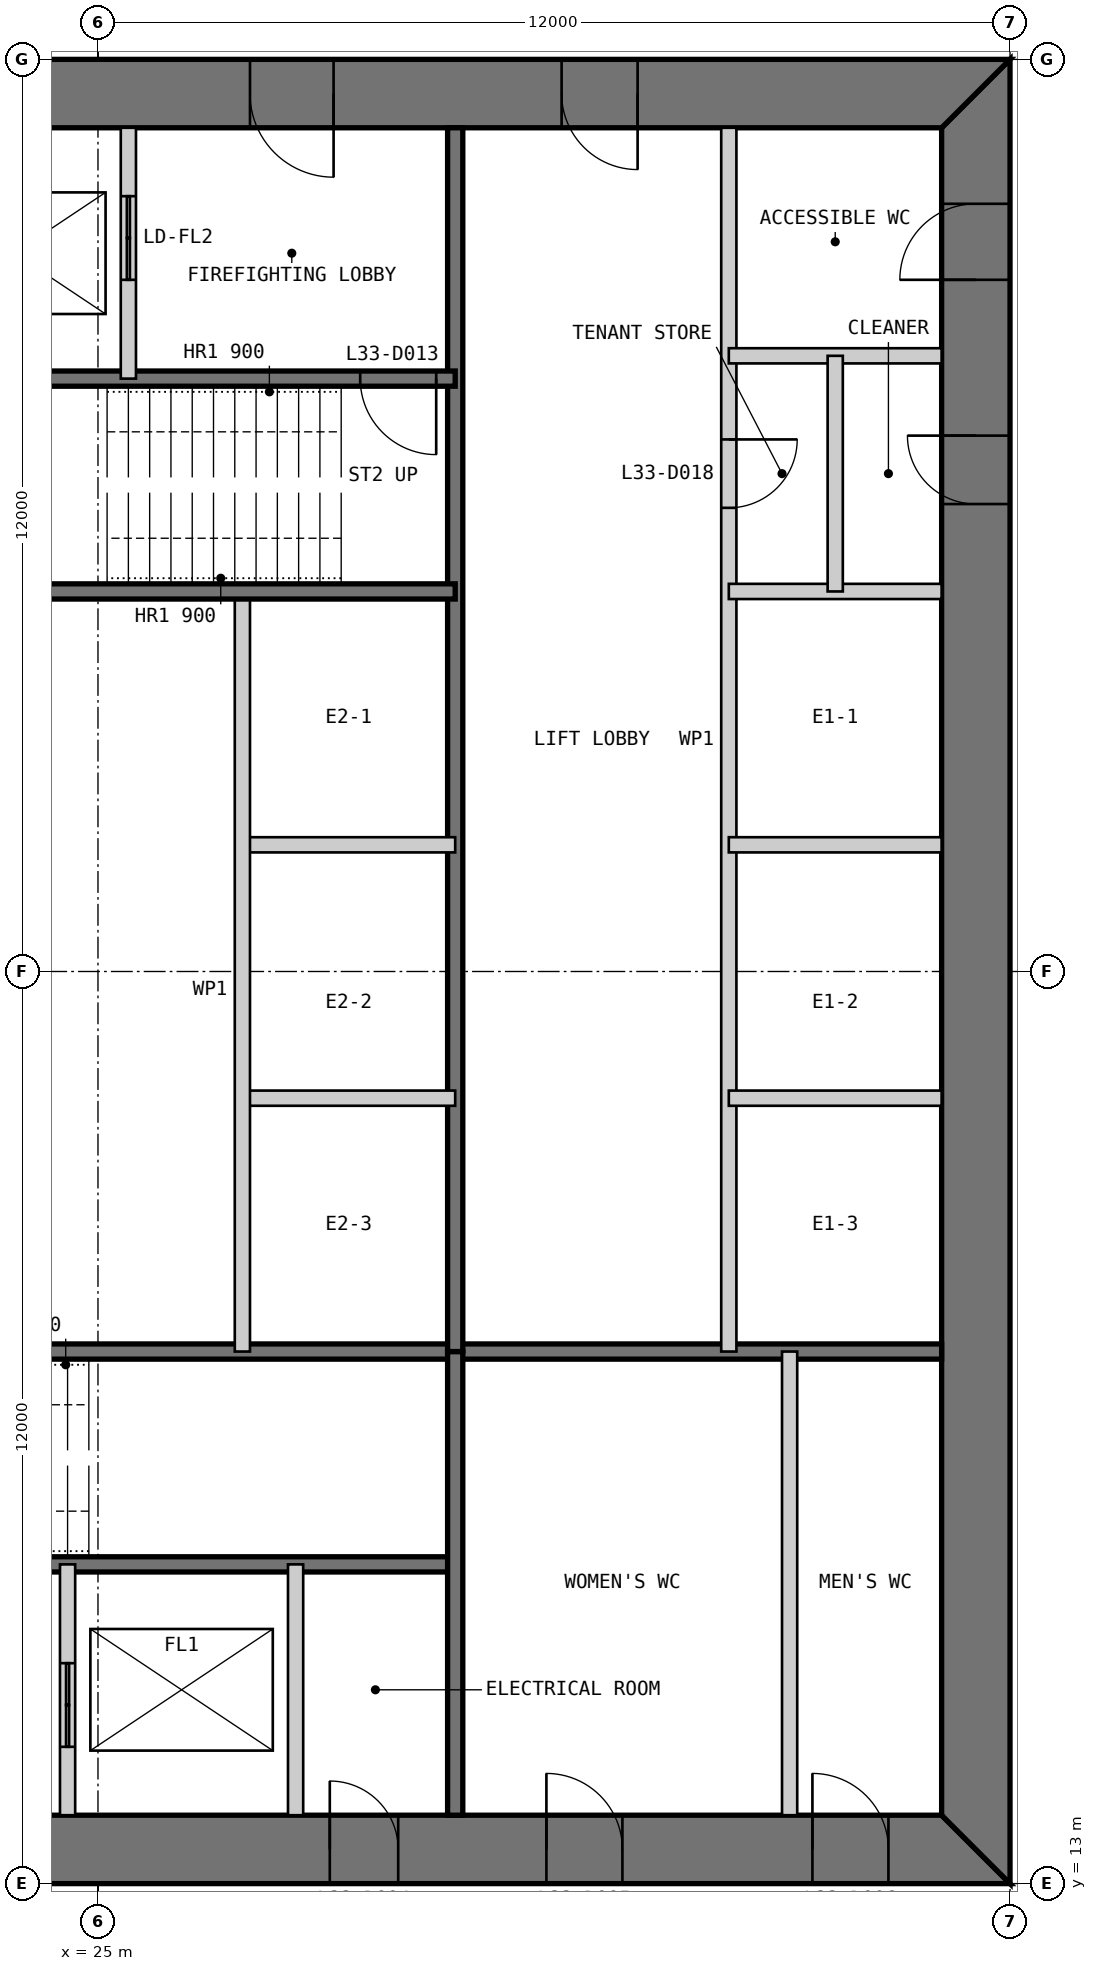
"""IFC4 building model, lengths in metres.
Left out: names, types, materials, properties, quantities, classifications, styles, units other than length and angle.
Written with IfcOpenShell. Run it as: python <this file> out.ifc"""

import sys

from ifc_helpers import new_model, si_unit, direction, frame, frame_2d, origin, place, context, subcontext, project, spatial, polyline, rectangle, outline, extrude, element, fill, save


model = new_model("IFC4")
c1 = context("Model", 3, precision=1e-05, world=origin(), true_north=direction((0.0, 1.0)))
c2 = subcontext(c1, "Body", "Model", "MODEL_VIEW")
j1 = project(units=[si_unit("LENGTHUNIT", "METRE"), si_unit("PLANEANGLEUNIT", "RADIAN")], contexts=[c1])
p1 = place(None, origin())
s1 = spatial("IfcSite", under=j1, at=p1, CompositionType="ELEMENT")
p2 = place(p1, origin())
s2 = spatial("IfcBuilding", under=s1, at=p2, CompositionType="ELEMENT")
p3 = place(p2, frame((0.0, 0.0, 142.4)))
s3 = spatial("IfcBuildingStorey", under=s2, at=p3, CompositionType="ELEMENT", Elevation=142.4)
p4 = place(p3, frame((13.0, 13.45, 0.0), z_axis=(0.0, 0.0, 1.0), x_axis=(1.0, 0.0, 0.0)))
e1 = element("IfcWall", 1, at=p4, inside=s3, PredefinedType="SHEAR", context=c2, shape_type="SweptSolid", body=[
    extrude(outline(polyline([(0.0, -0.45), (24.0, -0.45), (23.1, 0.45), (0.9, 0.45), (0.0, -0.45)])), origin(), (0.0, 0.0, 1.0), 4.0),
])
p5 = place(p4, frame((4.9, 0.0, 0.0)))
e2 = element("IfcOpeningElement", 2, at=p5, cuts=e1, PredefinedType="OPENING", context=c2, shape_type="SweptSolid", body=[
    extrude(rectangle(XDim=1.0, YDim=2.2, at=frame_2d((0.5, 1.1))), frame((0.0, 0.46, 0.0), z_axis=(0.0, -1.0, 0.0), x_axis=(1.0, 0.0, 0.0)), (0.0, 0.0, 1.0), 0.92),
])
p6 = place(p4, frame((8.9, 0.0, 0.0)))
e3 = element("IfcOpeningElement", 3, at=p6, cuts=e1, PredefinedType="OPENING", context=c2, shape_type="SweptSolid", body=[
    extrude(rectangle(XDim=1.1, YDim=2.2, at=frame_2d((0.55, 1.1))), frame((0.0, 0.46, 0.0), z_axis=(0.0, -1.0, 0.0), x_axis=(1.0, 0.0, 0.0)), (0.0, 0.0, 1.0), 0.92),
])
p7 = place(p4, frame((15.05, 0.0, 0.0)))
e4 = element("IfcOpeningElement", 4, at=p7, cuts=e1, PredefinedType="OPENING", context=c2, shape_type="SweptSolid", body=[
    extrude(rectangle(XDim=0.9, YDim=2.2, at=frame_2d((0.45, 1.1))), frame((0.0, 0.46, 0.0), z_axis=(0.0, -1.0, 0.0), x_axis=(1.0, 0.0, 0.0)), (0.0, 0.0, 1.0), 0.92),
])
p8 = place(p4, frame((17.9, 0.0, 0.0)))
e5 = element("IfcOpeningElement", 5, at=p8, cuts=e1, PredefinedType="OPENING", context=c2, shape_type="SweptSolid", body=[
    extrude(rectangle(XDim=1.0, YDim=2.2, at=frame_2d((0.5, 1.1))), frame((0.0, 0.46, 0.0), z_axis=(0.0, -1.0, 0.0), x_axis=(1.0, 0.0, 0.0)), (0.0, 0.0, 1.0), 0.92),
])
p9 = place(p4, frame((21.4, 0.0, 0.0)))
e6 = element("IfcOpeningElement", 6, at=p9, cuts=e1, PredefinedType="OPENING", context=c2, shape_type="SweptSolid", body=[
    extrude(rectangle(XDim=1.0, YDim=2.2, at=frame_2d((0.5, 1.1))), frame((0.0, 0.46, 0.0), z_axis=(0.0, -1.0, 0.0), x_axis=(1.0, 0.0, 0.0)), (0.0, 0.0, 1.0), 0.92),
])
p10 = place(p3, frame((36.55, 13.9, 0.0), z_axis=(0.0, 0.0, 1.0), x_axis=(0.0, 1.0, 0.0)))
e7 = element("IfcWall", 7, at=p10, inside=s3, PredefinedType="SHEAR", context=c2, shape_type="SweptSolid", body=[
    extrude(outline(polyline([(-0.9, -0.45), (23.1, -0.45), (22.2, 0.45), (0.0, 0.45), (-0.9, -0.45)])), origin(), (0.0, 0.0, 1.0), 4.0),
])
p11 = place(p10, frame((20.2, 0.0, 0.0)))
e8 = element("IfcOpeningElement", 8, at=p11, cuts=e7, PredefinedType="OPENING", context=c2, shape_type="SweptSolid", body=[
    extrude(rectangle(XDim=1.0, YDim=2.2, at=frame_2d((0.5, 1.1))), frame((0.0, 0.46, 0.0), z_axis=(0.0, -1.0, 0.0), x_axis=(1.0, 0.0, 0.0)), (0.0, 0.0, 1.0), 0.92),
])
p12 = place(p10, frame((17.25, 0.0, 0.0)))
e9 = element("IfcOpeningElement", 9, at=p12, cuts=e7, PredefinedType="OPENING", context=c2, shape_type="SweptSolid", body=[
    extrude(rectangle(XDim=0.9, YDim=2.2, at=frame_2d((0.45, 1.1))), frame((0.0, 0.46, 0.0), z_axis=(0.0, -1.0, 0.0), x_axis=(1.0, 0.0, 0.0)), (0.0, 0.0, 1.0), 0.92),
])
p13 = place(p3, frame((37.0, 36.55, 0.0), z_axis=(0.0, 0.0, 1.0), x_axis=(-1.0, 0.0, 0.0)))
e10 = element("IfcWall", 10, at=p13, inside=s3, PredefinedType="SHEAR", context=c2, shape_type="SweptSolid", body=[
    extrude(outline(polyline([(0.0, -0.45), (24.0, -0.45), (23.1, 0.45), (0.9, 0.45), (0.0, -0.45)])), origin(), (0.0, 0.0, 1.0), 4.0),
])
p14 = place(p13, frame((4.9, 0.0, 0.0)))
e11 = element("IfcOpeningElement", 11, at=p14, cuts=e10, PredefinedType="OPENING", context=c2, shape_type="SweptSolid", body=[
    extrude(rectangle(XDim=1.0, YDim=2.2, at=frame_2d((0.5, 1.1))), frame((0.0, 0.46, 0.0), z_axis=(0.0, -1.0, 0.0), x_axis=(1.0, 0.0, 0.0)), (0.0, 0.0, 1.0), 0.92),
])
p15 = place(p13, frame((8.9, 0.0, 0.0)))
e12 = element("IfcOpeningElement", 12, at=p15, cuts=e10, PredefinedType="OPENING", context=c2, shape_type="SweptSolid", body=[
    extrude(rectangle(XDim=1.1, YDim=2.2, at=frame_2d((0.55, 1.1))), frame((0.0, 0.46, 0.0), z_axis=(0.0, -1.0, 0.0), x_axis=(1.0, 0.0, 0.0)), (0.0, 0.0, 1.0), 0.92),
])
p16 = place(p13, frame((15.05, 0.0, 0.0)))
e13 = element("IfcOpeningElement", 13, at=p16, cuts=e10, PredefinedType="OPENING", context=c2, shape_type="SweptSolid", body=[
    extrude(rectangle(XDim=0.9, YDim=2.2, at=frame_2d((0.45, 1.1))), frame((0.0, 0.46, 0.0), z_axis=(0.0, -1.0, 0.0), x_axis=(1.0, 0.0, 0.0)), (0.0, 0.0, 1.0), 0.92),
])
p17 = place(p13, frame((17.9, 0.0, 0.0)))
e14 = element("IfcOpeningElement", 14, at=p17, cuts=e10, PredefinedType="OPENING", context=c2, shape_type="SweptSolid", body=[
    extrude(rectangle(XDim=1.0, YDim=2.2, at=frame_2d((0.5, 1.1))), frame((0.0, 0.46, 0.0), z_axis=(0.0, -1.0, 0.0), x_axis=(1.0, 0.0, 0.0)), (0.0, 0.0, 1.0), 0.92),
])
p18 = place(p13, frame((21.4, 0.0, 0.0)))
e15 = element("IfcOpeningElement", 15, at=p18, cuts=e10, PredefinedType="OPENING", context=c2, shape_type="SweptSolid", body=[
    extrude(rectangle(XDim=1.0, YDim=2.2, at=frame_2d((0.5, 1.1))), frame((0.0, 0.46, 0.0), z_axis=(0.0, -1.0, 0.0), x_axis=(1.0, 0.0, 0.0)), (0.0, 0.0, 1.0), 0.92),
])
p19 = place(p3, frame((20.3, 17.2, 0.0), z_axis=(0.0, 0.0, 1.0), x_axis=(1.0, 0.0, 0.0)))
e16 = element("IfcWall", 16, at=p19, inside=s3, PredefinedType="SOLIDWALL", context=c2, shape_type="SweptSolid", body=[
    extrude(rectangle(XDim=9.4, YDim=0.2, at=frame_2d((4.7, 0.0))), origin(), (0.0, 0.0, 1.0), 3.8),
])
p20 = place(p19, frame((0.25, 0.0, 0.0)))
e17 = element("IfcOpeningElement", 17, at=p20, cuts=e16, PredefinedType="OPENING", context=c2, shape_type="SweptSolid", body=[
    extrude(rectangle(XDim=1.0, YDim=2.2, at=frame_2d((0.5, 1.1))), frame((0.0, 0.11, 0.0), z_axis=(0.0, -1.0, 0.0), x_axis=(1.0, 0.0, 0.0)), (0.0, 0.0, 1.0), 0.22),
])
p21 = place(p3, frame((20.3, 20.0, 0.0), z_axis=(0.0, 0.0, 1.0), x_axis=(1.0, 0.0, 0.0)))
e18 = element("IfcWall", 18, at=p21, inside=s3, PredefinedType="SOLIDWALL", context=c2, shape_type="SweptSolid", body=[
    extrude(rectangle(XDim=15.8, YDim=0.2, at=frame_2d((7.9, 0.0))), origin(), (0.0, 0.0, 1.0), 3.8),
])
p22 = place(p3, frame((24.6, 13.9, 0.0), z_axis=(0.0, 0.0, 1.0), x_axis=(0.0, 1.0, 0.0)))
e19 = element("IfcWall", 19, at=p22, inside=s3, PredefinedType="PARTITIONING", context=c2, shape_type="SweptSolid", body=[
    extrude(rectangle(XDim=3.3, YDim=0.2, at=frame_2d((1.65, 0.0))), origin(), (0.0, 0.0, 1.0), 3.8),
])
p23 = place(p22, frame((0.9, 0.0, 0.0)))
e20 = element("IfcOpeningElement", 20, at=p23, cuts=e19, PredefinedType="OPENING", context=c2, shape_type="SweptSolid", body=[
    extrude(rectangle(XDim=1.1, YDim=2.2, at=frame_2d((0.55, 1.1))), frame((0.0, 0.11, 0.0), z_axis=(0.0, -1.0, 0.0), x_axis=(1.0, 0.0, 0.0)), (0.0, 0.0, 1.0), 0.22),
])
p24 = place(p3, frame((27.6, 13.9, 0.0), z_axis=(0.0, 0.0, 1.0), x_axis=(0.0, 1.0, 0.0)))
e21 = element("IfcWall", 21, at=p24, inside=s3, PredefinedType="PARTITIONING", context=c2, shape_type="SweptSolid", body=[
    extrude(rectangle(XDim=3.3, YDim=0.2, at=frame_2d((1.65, 0.0))), origin(), (0.0, 0.0, 1.0), 3.8),
])
p25 = place(p3, frame((29.7, 13.9, 0.0), z_axis=(0.0, 0.0, 1.0), x_axis=(0.0, 1.0, 0.0)))
e22 = element("IfcWall", 22, at=p25, inside=s3, PredefinedType="SOLIDWALL", context=c2, shape_type="SweptSolid", body=[
    extrude(rectangle(XDim=6.1, YDim=0.2, at=frame_2d((3.05, 0.0))), origin(), (0.0, 0.0, 1.0), 3.8),
])
p26 = place(p3, frame((34.1, 13.9, 0.0), z_axis=(0.0, 0.0, 1.0), x_axis=(0.0, 1.0, 0.0)))
e23 = element("IfcWall", 23, at=p26, inside=s3, PredefinedType="PARTITIONING", context=c2, shape_type="SweptSolid", body=[
    extrude(rectangle(XDim=6.1, YDim=0.2, at=frame_2d((3.05, 0.0))), origin(), (0.0, 0.0, 1.0), 3.8),
])
p27 = place(p3, frame((33.3, 36.1, 0.0), z_axis=(0.0, 0.0, 1.0), x_axis=(0.0, -1.0, 0.0)))
e24 = element("IfcWall", 24, at=p27, inside=s3, PredefinedType="PARTITIONING", context=c2, shape_type="SweptSolid", body=[
    extrude(rectangle(XDim=16.1, YDim=0.2, at=frame_2d((8.05, 0.0))), origin(), (0.0, 0.0, 1.0), 3.8),
])
p28 = place(p27, frame((4.1, 0.0, 0.0)))
e25 = element("IfcOpeningElement", 25, at=p28, cuts=e24, PredefinedType="OPENING", context=c2, shape_type="SweptSolid", body=[
    extrude(rectangle(XDim=0.9, YDim=2.2, at=frame_2d((0.45, 1.1))), frame((0.0, 0.11, 0.0), z_axis=(0.0, -1.0, 0.0), x_axis=(1.0, 0.0, 0.0)), (0.0, 0.0, 1.0), 0.22),
])
p29 = place(p3, frame((29.7, 36.1, 0.0), z_axis=(0.0, 0.0, 1.0), x_axis=(0.0, -1.0, 0.0)))
e26 = element("IfcWall", 26, at=p29, inside=s3, PredefinedType="SOLIDWALL", context=c2, shape_type="SweptSolid", body=[
    extrude(rectangle(XDim=16.1, YDim=0.2, at=frame_2d((8.05, 0.0))), origin(), (0.0, 0.0, 1.0), 3.8),
])
for number, where, z_axis, x_axis in (
    (27, (36.1, 30.0, 0.0), (0.0, 0.0, 1.0), (-1.0, 0.0, 0.0)),
    (28, (36.1, 26.667, 0.0), (0.0, 0.0, 1.0), (-1.0, 0.0, 0.0)),
    (29, (36.1, 23.333, 0.0), (0.0, 0.0, 1.0), (-1.0, 0.0, 0.0)),
    (30, (29.7, 26.667, 0.0), (0.0, 0.0, 1.0), (-1.0, 0.0, 0.0)),
    (31, (29.7, 23.333, 0.0), (0.0, 0.0, 1.0), (-1.0, 0.0, 0.0)),
):
    element("IfcWall", number, at=place(p3, frame(where, z_axis=z_axis, x_axis=x_axis)), inside=s3, PredefinedType="PARTITIONING", context=c2, shape_type="SweptSolid", body=[
        extrude(rectangle(XDim=2.8, YDim=0.2, at=frame_2d((1.4, 0.0))), origin(), (0.0, 0.0, 1.0), 3.8),
    ])
p30 = place(p3, frame((26.9, 30.0, 0.0), z_axis=(0.0, 0.0, 1.0), x_axis=(0.0, -1.0, 0.0)))
e32 = element("IfcWall", 32, at=p30, inside=s3, PredefinedType="PARTITIONING", context=c2, shape_type="SweptSolid", body=[
    extrude(rectangle(XDim=10.0, YDim=0.2, at=frame_2d((5.0, 0.0))), origin(), (0.0, 0.0, 1.0), 3.8),
])
p31 = place(p3, frame((29.7, 32.8, 0.0), z_axis=(0.0, 0.0, 1.0), x_axis=(-1.0, 0.0, 0.0)))
e33 = element("IfcWall", 33, at=p31, inside=s3, PredefinedType="SOLIDWALL", context=c2, shape_type="SweptSolid", body=[
    extrude(rectangle(XDim=9.4, YDim=0.2, at=frame_2d((4.7, 0.0))), origin(), (0.0, 0.0, 1.0), 3.8),
])
p32 = place(p31, frame((0.25, 0.0, 0.0)))
e34 = element("IfcOpeningElement", 34, at=p32, cuts=e33, PredefinedType="OPENING", context=c2, shape_type="SweptSolid", body=[
    extrude(rectangle(XDim=1.0, YDim=2.2, at=frame_2d((0.5, 1.1))), frame((0.0, 0.11, 0.0), z_axis=(0.0, -1.0, 0.0), x_axis=(1.0, 0.0, 0.0)), (0.0, 0.0, 1.0), 0.22),
])
p33 = place(p3, frame((29.7, 30.0, 0.0), z_axis=(0.0, 0.0, 1.0), x_axis=(-1.0, 0.0, 0.0)))
e35 = element("IfcWall", 35, at=p33, inside=s3, PredefinedType="SOLIDWALL", context=c2, shape_type="SweptSolid", body=[
    extrude(rectangle(XDim=15.8, YDim=0.2, at=frame_2d((7.9, 0.0))), origin(), (0.0, 0.0, 1.0), 3.8),
])
p34 = place(p3, frame((25.4, 36.1, 0.0), z_axis=(0.0, 0.0, 1.0), x_axis=(0.0, -1.0, 0.0)))
e36 = element("IfcWall", 36, at=p34, inside=s3, PredefinedType="PARTITIONING", context=c2, shape_type="SweptSolid", body=[
    extrude(rectangle(XDim=3.3, YDim=0.2, at=frame_2d((1.65, 0.0))), origin(), (0.0, 0.0, 1.0), 3.8),
])
p35 = place(p34, frame((0.9, 0.0, 0.0)))
e37 = element("IfcOpeningElement", 37, at=p35, cuts=e36, PredefinedType="OPENING", context=c2, shape_type="SweptSolid", body=[
    extrude(rectangle(XDim=1.1, YDim=2.2, at=frame_2d((0.55, 1.1))), frame((0.0, 0.11, 0.0), z_axis=(0.0, -1.0, 0.0), x_axis=(1.0, 0.0, 0.0)), (0.0, 0.0, 1.0), 0.22),
])
p36 = place(p3, frame((36.1, 33.1, 0.0), z_axis=(0.0, 0.0, 1.0), x_axis=(-1.0, 0.0, 0.0)))
e38 = element("IfcWall", 38, at=p36, inside=s3, PredefinedType="PARTITIONING", context=c2, shape_type="SweptSolid", body=[
    extrude(rectangle(XDim=2.8, YDim=0.2, at=frame_2d((1.4, 0.0))), origin(), (0.0, 0.0, 1.0), 3.8),
])
p37 = place(p3, frame((34.7, 33.1, 0.0), z_axis=(0.0, 0.0, 1.0), x_axis=(0.0, -1.0, 0.0)))
e39 = element("IfcWall", 39, at=p37, inside=s3, PredefinedType="PARTITIONING", context=c2, shape_type="SweptSolid", body=[
    extrude(rectangle(XDim=3.1, YDim=0.2, at=frame_2d((1.55, 0.0))), origin(), (0.0, 0.0, 1.0), 3.8),
])
p38 = place(p7, origin())
e40 = element("IfcDoor", 40, at=p38, inside=s3, OperationType="SINGLE_SWING_LEFT", PredefinedType="DOOR", context=c2, shape_type="SweptSolid", body=[
    extrude(rectangle(XDim=0.9, YDim=2.2, at=frame_2d((0.45, 1.1))), frame((0.0, 0.025, 0.0), z_axis=(0.0, -1.0, 0.0), x_axis=(1.0, 0.0, 0.0)), (0.0, 0.0, 1.0), 0.05),
    extrude(outline(polyline([(0.0, 0.0), (0.04, 0.0), (0.04, 2.16), (0.86, 2.16), (0.86, 0.0), (0.9, 0.0), (0.9, 2.2), (0.0, 2.2), (0.0, 0.0)])), frame((0.0, 0.3, 0.0), z_axis=(0.0, -1.0, 0.0), x_axis=(1.0, 0.0, 0.0)), (0.0, 0.0, 1.0), 0.6),
])
fill(e4, e40)
p39 = place(p8, origin())
e41 = element("IfcDoor", 41, at=p39, inside=s3, OperationType="SINGLE_SWING_LEFT", PredefinedType="DOOR", context=c2, shape_type="SweptSolid", body=[
    extrude(rectangle(XDim=1.0, YDim=2.2, at=frame_2d((0.5, 1.1))), frame((0.0, 0.025, 0.0), z_axis=(0.0, -1.0, 0.0), x_axis=(1.0, 0.0, 0.0)), (0.0, 0.0, 1.0), 0.05),
    extrude(outline(polyline([(0.0, 0.0), (0.04, 0.0), (0.04, 2.16), (0.96, 2.16), (0.96, 0.0), (1.0, 0.0), (1.0, 2.2), (0.0, 2.2), (0.0, 0.0)])), frame((0.0, 0.3, 0.0), z_axis=(0.0, -1.0, 0.0), x_axis=(1.0, 0.0, 0.0)), (0.0, 0.0, 1.0), 0.6),
])
fill(e5, e41)
p40 = place(p9, origin())
e42 = element("IfcDoor", 42, at=p40, inside=s3, OperationType="SINGLE_SWING_LEFT", PredefinedType="DOOR", context=c2, shape_type="SweptSolid", body=[
    extrude(rectangle(XDim=1.0, YDim=2.2, at=frame_2d((0.5, 1.1))), frame((0.0, 0.025, 0.0), z_axis=(0.0, -1.0, 0.0), x_axis=(1.0, 0.0, 0.0)), (0.0, 0.0, 1.0), 0.05),
    extrude(outline(polyline([(0.0, 0.0), (0.04, 0.0), (0.04, 2.16), (0.96, 2.16), (0.96, 0.0), (1.0, 0.0), (1.0, 2.2), (0.0, 2.2), (0.0, 0.0)])), frame((0.0, 0.3, 0.0), z_axis=(0.0, -1.0, 0.0), x_axis=(1.0, 0.0, 0.0)), (0.0, 0.0, 1.0), 0.6),
])
fill(e6, e42)
p41 = place(p14, origin())
e43 = element("IfcDoor", 43, at=p41, inside=s3, OperationType="SINGLE_SWING_LEFT", PredefinedType="DOOR", context=c2, shape_type="SweptSolid", body=[
    extrude(rectangle(XDim=1.0, YDim=2.2, at=frame_2d((0.5, 1.1))), frame((0.0, 0.025, 0.0), z_axis=(0.0, -1.0, 0.0), x_axis=(1.0, 0.0, 0.0)), (0.0, 0.0, 1.0), 0.05),
    extrude(outline(polyline([(0.0, 0.0), (0.04, 0.0), (0.04, 2.16), (0.96, 2.16), (0.96, 0.0), (1.0, 0.0), (1.0, 2.2), (0.0, 2.2), (0.0, 0.0)])), frame((0.0, 0.3, 0.0), z_axis=(0.0, -1.0, 0.0), x_axis=(1.0, 0.0, 0.0)), (0.0, 0.0, 1.0), 0.6),
])
fill(e11, e43)
p42 = place(p15, origin())
e44 = element("IfcDoor", 44, at=p42, inside=s3, OperationType="SINGLE_SWING_LEFT", PredefinedType="DOOR", context=c2, shape_type="SweptSolid", body=[
    extrude(rectangle(XDim=1.1, YDim=2.2, at=frame_2d((0.55, 1.1))), frame((0.0, 0.025, 0.0), z_axis=(0.0, -1.0, 0.0), x_axis=(1.0, 0.0, 0.0)), (0.0, 0.0, 1.0), 0.05),
    extrude(outline(polyline([(0.0, 0.0), (0.04, 0.0), (0.04, 2.16), (1.06, 2.16), (1.06, 0.0), (1.1, 0.0), (1.1, 2.2), (0.0, 2.2), (0.0, 0.0)])), frame((0.0, 0.3, 0.0), z_axis=(0.0, -1.0, 0.0), x_axis=(1.0, 0.0, 0.0)), (0.0, 0.0, 1.0), 0.6),
])
fill(e12, e44)
p43 = place(p32, origin())
e45 = element("IfcDoor", 45, at=p43, inside=s3, OperationType="SINGLE_SWING_LEFT", PredefinedType="DOOR", context=c2, shape_type="SweptSolid", body=[
    extrude(rectangle(XDim=1.0, YDim=2.2, at=frame_2d((0.5, 1.1))), frame((0.0, 0.025, 0.0), z_axis=(0.0, -1.0, 0.0), x_axis=(1.0, 0.0, 0.0)), (0.0, 0.0, 1.0), 0.05),
])
fill(e34, e45)
p44 = place(p11, origin())
e46 = element("IfcDoor", 46, at=p44, inside=s3, OperationType="SINGLE_SWING_LEFT", PredefinedType="DOOR", context=c2, shape_type="SweptSolid", body=[
    extrude(rectangle(XDim=1.0, YDim=2.2, at=frame_2d((0.5, 1.1))), frame((0.0, 0.025, 0.0), z_axis=(0.0, -1.0, 0.0), x_axis=(1.0, 0.0, 0.0)), (0.0, 0.0, 1.0), 0.05),
    extrude(outline(polyline([(0.0, 0.0), (0.04, 0.0), (0.04, 2.16), (0.96, 2.16), (0.96, 0.0), (1.0, 0.0), (1.0, 2.2), (0.0, 2.2), (0.0, 0.0)])), frame((0.0, 0.3, 0.0), z_axis=(0.0, -1.0, 0.0), x_axis=(1.0, 0.0, 0.0)), (0.0, 0.0, 1.0), 0.6),
])
fill(e8, e46)
p45 = place(p28, origin())
e47 = element("IfcDoor", 47, at=p45, inside=s3, OperationType="SINGLE_SWING_LEFT", PredefinedType="DOOR", context=c2, shape_type="SweptSolid", body=[
    extrude(rectangle(XDim=0.9, YDim=2.2, at=frame_2d((0.45, 1.1))), frame((0.0, 0.025, 0.0), z_axis=(0.0, -1.0, 0.0), x_axis=(1.0, 0.0, 0.0)), (0.0, 0.0, 1.0), 0.05),
])
fill(e25, e47)
p46 = place(p12, origin())
e48 = element("IfcDoor", 48, at=p46, inside=s3, OperationType="SINGLE_SWING_RIGHT", PredefinedType="DOOR", context=c2, shape_type="SweptSolid", body=[
    extrude(rectangle(XDim=0.9, YDim=2.2, at=frame_2d((0.45, 1.1))), frame((0.0, 0.025, 0.0), z_axis=(0.0, -1.0, 0.0), x_axis=(1.0, 0.0, 0.0)), (0.0, 0.0, 1.0), 0.05),
    extrude(outline(polyline([(0.0, 0.0), (0.04, 0.0), (0.04, 2.16), (0.86, 2.16), (0.86, 0.0), (0.9, 0.0), (0.9, 2.2), (0.0, 2.2), (0.0, 0.0)])), frame((0.0, 0.3, 0.0), z_axis=(0.0, -1.0, 0.0), x_axis=(1.0, 0.0, 0.0)), (0.0, 0.0, 1.0), 0.6),
])
fill(e9, e48)
p47 = place(p23, origin())
e49 = element("IfcDoor", 49, at=p47, inside=s3, OperationType="DOUBLE_DOOR_SLIDING", PredefinedType="DOOR", context=c2, shape_type="SweptSolid", body=[
    extrude(rectangle(XDim=1.1, YDim=2.2, at=frame_2d((0.55, 1.1))), frame((0.0, 0.025, 0.0), z_axis=(0.0, -1.0, 0.0), x_axis=(1.0, 0.0, 0.0)), (0.0, 0.0, 1.0), 0.05),
])
fill(e20, e49)
p48 = place(p35, origin())
e50 = element("IfcDoor", 50, at=p48, inside=s3, OperationType="DOUBLE_DOOR_SLIDING", PredefinedType="DOOR", context=c2, shape_type="SweptSolid", body=[
    extrude(rectangle(XDim=1.1, YDim=2.2, at=frame_2d((0.55, 1.1))), frame((0.0, 0.025, 0.0), z_axis=(0.0, -1.0, 0.0), x_axis=(1.0, 0.0, 0.0)), (0.0, 0.0, 1.0), 0.05),
])
fill(e37, e50)
save(model, sys.argv[1])
